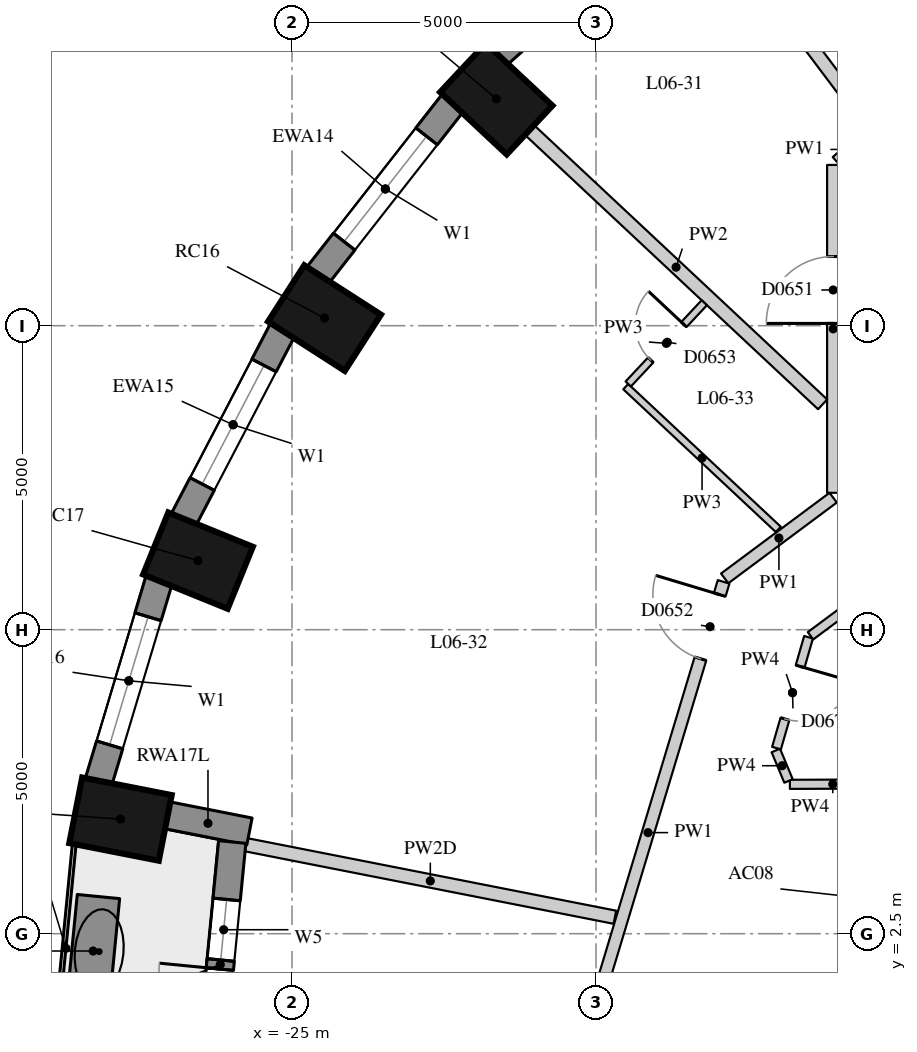
"""IFC4 building model, lengths in metres.
Left out: names, types, materials, properties, quantities, classifications, styles, units other than length and angle.
Written with IfcOpenShell. Run it as: python <this file> out.ifc"""

import sys

from ifc_helpers import new_model, si_unit, direction, frame, frame_2d, origin, origin_2d, place, context, subcontext, project, spatial, rectangle, extrude, element, fill, save


model = new_model("IFC4")
c1 = context("Model", 3, precision=1e-05, world=origin(), true_north=direction((0.0, 1.0)))
c2 = subcontext(c1, "Body", "Model", "MODEL_VIEW")
j1 = project(units=[si_unit("LENGTHUNIT", "METRE"), si_unit("PLANEANGLEUNIT", "RADIAN")], contexts=[c1])
p1 = place(None, origin())
s1 = spatial("IfcSite", under=j1, at=p1, CompositionType="ELEMENT")
p2 = place(p1, origin())
s2 = spatial("IfcBuilding", under=s1, at=p2, CompositionType="ELEMENT")
p3 = place(p2, frame((0.0, 0.0, 28.3)))
s3 = spatial("IfcBuildingStorey", under=s2, at=p3, CompositionType="ELEMENT", Elevation=28.3)
for number, where, z_axis, x_axis in (
    (1, (-21.641, 16.23, 0.0), (0.0, 0.0, 1.0), (-0.73, 0.683, 0.0)),
    (2, (-24.465, 12.625, 0.0), (0.0, 0.0, 1.0), (-0.841, 0.541, 0.0)),
    (3, (-26.546, 8.636, 0.0), (0.0, 0.0, 1.0), (-0.927, 0.376, 0.0)),
    (4, (-27.821, 4.385, 0.0), (0.0, 0.0, 1.0), (-0.981, 0.193, 0.0)),
):
    element("IfcColumn", number, at=place(p3, frame(where, z_axis=z_axis, x_axis=x_axis)), inside=s3, PredefinedType="COLUMN", context=c2, shape_type="SweptSolid", body=[
        extrude(rectangle(XDim=1.5, YDim=1.1, at=origin_2d()), origin(), (0.0, 0.0, 1.0), 3.3),
    ])
p4 = place(p3, frame((-18.871, 19.407, 0.0), z_axis=(0.0, 0.0, 1.0), x_axis=(-0.745526233716, -0.66647628228, 0.0)))
e5 = element("IfcWall", 5, at=p4, inside=s3, PredefinedType="SOLIDWALL", context=c2, shape_type="SweptSolid", body=[
    extrude(rectangle(XDim=3.697, YDim=0.45, at=frame_2d((1.848, 0.0))), origin(), (0.0, 0.0, 1.0), 3.02),
])
p5 = place(p4, frame((0.749, 0.0, 0.4)))
e6 = element("IfcOpeningElement", 6, at=p5, cuts=e5, PredefinedType="OPENING", context=c2, shape_type="SweptSolid", body=[
    extrude(rectangle(XDim=2.2, YDim=1.75, at=frame_2d((1.1, 0.875))), frame((0.0, 0.235, 0.0), z_axis=(0.0, -1.0, 0.0), x_axis=(1.0, 0.0, 0.0)), (0.0, 0.0, 1.0), 0.47),
])
p6 = place(p3, frame((-22.352, 16.17, 0.0), z_axis=(0.0, 0.0, 1.0), x_axis=(-0.616661975264, -0.787228053529, 0.0)))
e7 = element("IfcWall", 7, at=p6, inside=s3, PredefinedType="SOLIDWALL", context=c2, shape_type="SweptSolid", body=[
    extrude(rectangle(XDim=3.61, YDim=0.45, at=frame_2d((1.805, 0.0))), origin(), (0.0, 0.0, 1.0), 3.02),
])
p7 = place(p6, frame((0.705, 0.0, 0.4)))
e8 = element("IfcOpeningElement", 8, at=p7, cuts=e7, PredefinedType="OPENING", context=c2, shape_type="SweptSolid", body=[
    extrude(rectangle(XDim=2.2, YDim=1.75, at=frame_2d((1.1, 0.875))), frame((0.0, 0.235, 0.0), z_axis=(0.0, -1.0, 0.0), x_axis=(1.0, 0.0, 0.0)), (0.0, 0.0, 1.0), 0.47),
])
p8 = place(p3, frame((-25.152, 12.437, 0.0), z_axis=(0.0, 0.0, 1.0), x_axis=(-0.462492775226, -0.886623050041, 0.0)))
e9 = element("IfcWall", 9, at=p8, inside=s3, PredefinedType="SOLIDWALL", context=c2, shape_type="SweptSolid", body=[
    extrude(rectangle(XDim=3.532, YDim=0.45, at=frame_2d((1.766, 0.0))), origin(), (0.0, 0.0, 1.0), 3.02),
])
p9 = place(p8, frame((0.666, 0.0, 0.4)))
e10 = element("IfcOpeningElement", 10, at=p9, cuts=e9, PredefinedType="OPENING", context=c2, shape_type="SweptSolid", body=[
    extrude(rectangle(XDim=2.2, YDim=1.75, at=frame_2d((1.1, 0.875))), frame((0.0, 0.235, 0.0), z_axis=(0.0, -1.0, 0.0), x_axis=(1.0, 0.0, 0.0)), (0.0, 0.0, 1.0), 0.47),
])
p10 = place(p3, frame((-27.185, 8.323, 0.0), z_axis=(0.0, 0.0, 1.0), x_axis=(-0.287064133733, -0.957911364963, 0.0)))
e11 = element("IfcWall", 11, at=p10, inside=s3, PredefinedType="SOLIDWALL", context=c2, shape_type="SweptSolid", body=[
    extrude(rectangle(XDim=3.473, YDim=0.45, at=frame_2d((1.737, 0.0))), origin(), (0.0, 0.0, 1.0), 3.02),
])
p11 = place(p10, frame((0.637, 0.0, 0.4)))
e12 = element("IfcOpeningElement", 12, at=p11, cuts=e11, PredefinedType="OPENING", context=c2, shape_type="SweptSolid", body=[
    extrude(rectangle(XDim=2.2, YDim=1.75, at=frame_2d((1.1, 0.875))), frame((0.0, 0.235, 0.0), z_axis=(0.0, -1.0, 0.0), x_axis=(1.0, 0.0, 0.0)), (0.0, 0.0, 1.0), 0.47),
])
p12 = place(p3, frame((-27.064, 4.45, 0.0), z_axis=(0.0, 0.0, 1.0), x_axis=(0.98123042829, -0.192838913596, 0.0)))
e13 = element("IfcWall", 13, at=p12, inside=s3, PredefinedType="SOLIDWALL", context=c2, shape_type="SweptSolid", body=[
    extrude(rectangle(XDim=1.39, YDim=0.45, at=frame_2d((0.695, 0.0))), origin(), (0.0, 0.0, 1.0), 2.47),
])
p13 = place(p3, frame((-25.983, 4.008, 0.0), z_axis=(0.0, 0.0, 1.0), x_axis=(-0.097133468736, -0.995271364629, 0.0)))
e14 = element("IfcWall", 14, at=p13, inside=s3, PredefinedType="SOLIDWALL", context=c2, shape_type="SweptSolid", body=[
    extrude(rectangle(XDim=4.049, YDim=0.45, at=frame_2d((2.024, 0.0))), origin(), (0.0, 0.0, 1.0), 3.02),
])
p14 = place(p13, frame((0.949, 0.0, 0.4)))
e15 = element("IfcOpeningElement", 15, at=p14, cuts=e14, PredefinedType="OPENING", context=c2, shape_type="SweptSolid", body=[
    extrude(rectangle(XDim=1.0, YDim=1.75, at=frame_2d((0.5, 0.875))), frame((0.0, 0.235, 0.0), z_axis=(0.0, -1.0, 0.0), x_axis=(1.0, 0.0, 0.0)), (0.0, 0.0, 1.0), 0.47),
])
p15 = place(p13, frame((2.1, 0.0, 0.0)))
e16 = element("IfcOpeningElement", 16, at=p15, cuts=e14, PredefinedType="OPENING", context=c2, shape_type="SweptSolid", body=[
    extrude(rectangle(XDim=1.0, YDim=2.15, at=frame_2d((0.5, 1.075))), frame((0.0, 0.235, 0.0), z_axis=(0.0, -1.0, 0.0), x_axis=(1.0, 0.0, 0.0)), (0.0, 0.0, 1.0), 0.47),
])
p16 = place(p3, frame((-28.183, 3.111, 0.0), z_axis=(0.0, 0.0, 1.0), x_axis=(-0.097381768628, -0.995247100543, 0.0)))
e17 = element("IfcWall", 17, at=p16, inside=s3, PredefinedType="USERDEFINED", context=c2, shape_type="SweptSolid", body=[
    extrude(rectangle(XDim=1.8, YDim=0.7, at=frame_2d((0.9, 0.0))), origin(), (0.0, 0.0, 1.0), 0.75),
])
p17 = place(p3, frame((-17.884, 8.344, 0.0), z_axis=(0.0, 0.0, 1.0), x_axis=(0.802260120548, 0.596974621721, 0.0)))
e18 = element("IfcWall", 18, at=p17, inside=s3, PredefinedType="PARTITIONING", context=c2, shape_type="SweptSolid", body=[
    extrude(rectangle(XDim=2.224, YDim=0.2, at=frame_2d((1.112, 0.0))), origin(), (0.0, 0.0, 1.0), 3.02),
])
p18 = place(p3, frame((-16.1, 9.751, 0.0), z_axis=(0.0, 0.0, 1.0), x_axis=(0.0, 1.0, 0.0)))
e19 = element("IfcWall", 19, at=p18, inside=s3, PredefinedType="PARTITIONING", context=c2, shape_type="SweptSolid", body=[
    extrude(rectangle(XDim=5.393, YDim=0.2, at=frame_2d((2.696, 0.0))), origin(), (0.0, 0.0, 1.0), 3.02),
])
p19 = place(p18, frame((2.786, 0.0, 0.0)))
e20 = element("IfcOpeningElement", 20, at=p19, cuts=e19, PredefinedType="OPENING", context=c2, shape_type="SweptSolid", body=[
    extrude(rectangle(XDim=1.1, YDim=2.1, at=frame_2d((0.55, 1.05))), frame((0.0, 0.11, 0.0), z_axis=(0.0, -1.0, 0.0), x_axis=(1.0, 0.0, 0.0)), (0.0, 0.0, 1.0), 0.22),
])
p20 = place(p3, frame((-16.041, 15.198, 0.0), z_axis=(0.0, 0.0, 1.0), x_axis=(0.744722115519, 0.667374685359, 0.0)))
e21 = element("IfcWall", 21, at=p20, inside=s3, PredefinedType="PARTITIONING", context=c2, shape_type="SweptSolid", body=[
    extrude(rectangle(XDim=0.603, YDim=0.2, at=frame_2d((0.301, 0.0))), origin(), (0.0, 0.0, 1.0), 3.02),
])
p21 = place(p3, frame((-20.388, 0.038, 0.0), z_axis=(0.0, 0.0, 1.0), x_axis=(0.288600779805, 0.957449523419, 0.0)))
e22 = element("IfcWall", 22, at=p21, inside=s3, PredefinedType="PARTITIONING", context=c2, shape_type="SweptSolid", body=[
    extrude(rectangle(XDim=8.615, YDim=0.2, at=frame_2d((4.308, 0.0))), origin(), (0.0, 0.0, 1.0), 3.02),
])
p22 = place(p21, frame((7.295, 0.0, 0.0)))
e23 = element("IfcOpeningElement", 23, at=p22, cuts=e22, PredefinedType="OPENING", context=c2, shape_type="SweptSolid", body=[
    extrude(rectangle(XDim=1.1, YDim=2.1, at=frame_2d((0.55, 1.05))), frame((0.0, 0.11, 0.0), z_axis=(0.0, -1.0, 0.0), x_axis=(1.0, 0.0, 0.0)), (0.0, 0.0, 1.0), 0.22),
])
p23 = place(p21, frame((0.22, 0.0, 0.0)))
e24 = element("IfcOpeningElement", 24, at=p23, cuts=e22, PredefinedType="OPENING", context=c2, shape_type="SweptSolid", body=[
    extrude(rectangle(XDim=1.1, YDim=2.1, at=frame_2d((0.55, 1.05))), frame((0.0, 0.11, 0.0), z_axis=(0.0, -1.0, 0.0), x_axis=(1.0, 0.0, 0.0)), (0.0, 0.0, 1.0), 0.22),
])
p24 = place(p3, frame((-15.402, 4.961, 0.0), z_axis=(0.0, 0.0, 1.0), x_axis=(-0.999994001087, -0.003463782477, 0.0)))
e25 = element("IfcWall", 25, at=p24, inside=s3, PredefinedType="PARTITIONING", context=c2, shape_type="SweptSolid", body=[
    extrude(rectangle(XDim=1.41, YDim=0.15, at=frame_2d((0.705, 0.0))), origin(), (0.0, 0.0, 1.0), 3.02),
])
p25 = place(p3, frame((-16.834, 5.012, 0.0), z_axis=(0.0, 0.0, 1.0), x_axis=(-0.384455737739, 0.923143426408, 0.0)))
e26 = element("IfcWall", 26, at=p25, inside=s3, PredefinedType="PARTITIONING", context=c2, shape_type="SweptSolid", body=[
    extrude(rectangle(XDim=0.543, YDim=0.15, at=frame_2d((0.271, 0.0))), origin(), (0.0, 0.0, 1.0), 3.02),
])
p26 = place(p3, frame((-17.032, 5.552, 0.0), z_axis=(0.0, 0.0, 1.0), x_axis=(0.277658349549, 0.96067988473, 0.0)))
e27 = element("IfcWall", 27, at=p26, inside=s3, PredefinedType="PARTITIONING", context=c2, shape_type="SweptSolid", body=[
    extrude(rectangle(XDim=1.898, YDim=0.15, at=frame_2d((0.949, 0.0))), origin(), (0.0, 0.0, 1.0), 3.02),
])
p27 = place(p26, frame((0.499, 0.0, 0.0)))
e28 = element("IfcOpeningElement", 28, at=p27, cuts=e27, PredefinedType="OPENING", context=c2, shape_type="SweptSolid", body=[
    extrude(rectangle(XDim=0.9, YDim=2.1, at=frame_2d((0.45, 1.05))), frame((0.0, 0.085, 0.0), z_axis=(0.0, -1.0, 0.0), x_axis=(1.0, 0.0, 0.0)), (0.0, 0.0, 1.0), 0.17),
])
p28 = place(p3, frame((-16.473, 7.4, 0.0), z_axis=(0.0, 0.0, 1.0), x_axis=(0.802267063429, 0.596965291233, 0.0)))
e29 = element("IfcWall", 29, at=p28, inside=s3, PredefinedType="PARTITIONING", context=c2, shape_type="SweptSolid", body=[
    extrude(rectangle(XDim=2.41, YDim=0.15, at=frame_2d((1.205, 0.0))), origin(), (0.0, 0.0, 1.0), 3.02),
])
p29 = place(p3, frame((-17.708, 18.743, 0.0), z_axis=(0.0, 0.0, 1.0), x_axis=(0.601172757903, -0.799119086967, 0.0)))
e30 = element("IfcWall", 30, at=p29, inside=s3, PredefinedType="PARTITIONING", context=c2, shape_type="SweptSolid", body=[
    extrude(rectangle(XDim=3.729, YDim=0.22, at=frame_2d((1.864, 0.0))), origin(), (0.0, 0.0, 1.0), 2.57),
])
p30 = place(p3, frame((-21.093, 15.718, 0.0), z_axis=(0.0, 0.0, 1.0), x_axis=(0.73009284205, -0.683347965525, 0.0)))
e31 = element("IfcWall", 31, at=p30, inside=s3, PredefinedType="PARTITIONING", context=c2, shape_type="SweptSolid", body=[
    extrude(rectangle(XDim=6.602, YDim=0.22, at=frame_2d((3.301, 0.0))), origin(), (0.0, 0.0, 1.0), 3.02),
])
p31 = place(p3, frame((-25.761, 3.964, 0.0), z_axis=(0.0, 0.0, 1.0), x_axis=(0.981209888948, -0.192943395406, 0.0)))
e32 = element("IfcWall", 32, at=p31, inside=s3, PredefinedType="PARTITIONING", context=c2, shape_type="SweptSolid", body=[
    extrude(rectangle(XDim=6.188, YDim=0.22, at=frame_2d((3.094, 0.0))), origin(), (0.0, 0.0, 1.0), 2.47),
])
p32 = place(p3, frame((-17.002, 9.149, 0.0), z_axis=(0.0, 0.0, 1.0), x_axis=(-0.730093035944, 0.683347758368, 0.0)))
e33 = element("IfcWall", 33, at=p32, inside=s3, PredefinedType="PARTITIONING", context=c2, shape_type="SweptSolid", body=[
    extrude(rectangle(XDim=3.437, YDim=0.12, at=frame_2d((1.718, 0.0))), origin(), (0.0, 0.0, 1.0), 3.02),
])
p33 = place(p3, frame((-19.47, 11.542, 0.0), z_axis=(0.0, 0.0, 1.0), x_axis=(0.683306289544, 0.730131847456, 0.0)))
e34 = element("IfcWall", 34, at=p33, inside=s3, PredefinedType="PARTITIONING", context=c2, shape_type="SweptSolid", body=[
    extrude(rectangle(XDim=1.83, YDim=0.12, at=frame_2d((0.915, 0.0))), origin(), (0.0, 0.0, 1.0), 3.02),
])
p34 = place(p33, frame((0.54, 0.0, 0.0)))
e35 = element("IfcOpeningElement", 35, at=p34, cuts=e34, PredefinedType="OPENING", context=c2, shape_type="SweptSolid", body=[
    extrude(rectangle(XDim=0.8, YDim=2.1, at=frame_2d((0.4, 1.05))), frame((0.0, 0.07, 0.0), z_axis=(0.0, -1.0, 0.0), x_axis=(1.0, 0.0, 0.0)), (0.0, 0.0, 1.0), 0.14),
])
p35 = place(p7, origin())
e36 = element("IfcWindow", 36, at=p35, inside=s3, PartitioningType="SINGLE_PANEL", PredefinedType="WINDOW", context=c2, shape_type="SweptSolid", body=[
    extrude(rectangle(XDim=2.2, YDim=1.75, at=frame_2d((1.1, 0.875))), frame((0.0, 0.035, 0.0), z_axis=(0.0, -1.0, 0.0), x_axis=(1.0, 0.0, 0.0)), (0.0, 0.0, 1.0), 0.06),
])
fill(e8, e36)
p36 = place(p9, origin())
e37 = element("IfcWindow", 37, at=p36, inside=s3, PartitioningType="SINGLE_PANEL", PredefinedType="WINDOW", context=c2, shape_type="SweptSolid", body=[
    extrude(rectangle(XDim=2.2, YDim=1.75, at=frame_2d((1.1, 0.875))), frame((0.0, 0.035, 0.0), z_axis=(0.0, -1.0, 0.0), x_axis=(1.0, 0.0, 0.0)), (0.0, 0.0, 1.0), 0.06),
])
fill(e10, e37)
p37 = place(p11, origin())
e38 = element("IfcWindow", 38, at=p37, inside=s3, PartitioningType="SINGLE_PANEL", PredefinedType="WINDOW", context=c2, shape_type="SweptSolid", body=[
    extrude(rectangle(XDim=2.2, YDim=1.75, at=frame_2d((1.1, 0.875))), frame((0.0, 0.035, 0.0), z_axis=(0.0, -1.0, 0.0), x_axis=(1.0, 0.0, 0.0)), (0.0, 0.0, 1.0), 0.06),
])
fill(e12, e38)
p38 = place(p14, origin())
e39 = element("IfcWindow", 39, at=p38, inside=s3, PartitioningType="SINGLE_PANEL", PredefinedType="WINDOW", context=c2, shape_type="SweptSolid", body=[
    extrude(rectangle(XDim=1.0, YDim=1.75, at=frame_2d((0.5, 0.875))), frame((0.0, 0.035, 0.0), z_axis=(0.0, -1.0, 0.0), x_axis=(1.0, 0.0, 0.0)), (0.0, 0.0, 1.0), 0.06),
])
fill(e15, e39)
p39 = place(p15, frame((1.0, 0.0, 0.0), z_axis=(0.0, 0.0, 1.0), x_axis=(-1.0, 0.0, 0.0)))
e40 = element("IfcDoor", 40, at=p39, inside=s3, OperationType="SINGLE_SWING_RIGHT", PredefinedType="DOOR", context=c2, shape_type="SweptSolid", body=[
    extrude(rectangle(XDim=1.0, YDim=2.15, at=frame_2d((0.5, 1.075))), frame((0.0, 0.075, 0.0), z_axis=(0.0, -1.0, 0.0), x_axis=(1.0, 0.0, 0.0)), (0.0, 0.0, 1.0), 0.05),
])
fill(e16, e40)
p40 = place(p19, origin())
e41 = element("IfcDoor", 41, at=p40, inside=s3, OperationType="SINGLE_SWING_LEFT", PredefinedType="DOOR", context=c2, shape_type="SweptSolid", body=[
    extrude(rectangle(XDim=1.1, YDim=2.1, at=frame_2d((0.55, 1.05))), frame((0.0, 0.025, 0.0), z_axis=(0.0, -1.0, 0.0), x_axis=(1.0, 0.0, 0.0)), (0.0, 0.0, 1.0), 0.05),
])
fill(e20, e41)
p41 = place(p22, origin())
e42 = element("IfcDoor", 42, at=p41, inside=s3, OperationType="SINGLE_SWING_RIGHT", PredefinedType="DOOR", context=c2, shape_type="SweptSolid", body=[
    extrude(rectangle(XDim=1.1, YDim=2.1, at=frame_2d((0.55, 1.05))), frame((0.0, 0.025, 0.0), z_axis=(0.0, -1.0, 0.0), x_axis=(1.0, 0.0, 0.0)), (0.0, 0.0, 1.0), 0.05),
])
fill(e23, e42)
p42 = place(p34, origin())
e43 = element("IfcDoor", 43, at=p42, inside=s3, OperationType="SINGLE_SWING_RIGHT", PredefinedType="DOOR", context=c2, shape_type="SweptSolid", body=[
    extrude(rectangle(XDim=0.8, YDim=2.1, at=frame_2d((0.4, 1.05))), frame((0.0, 0.025, 0.0), z_axis=(0.0, -1.0, 0.0), x_axis=(1.0, 0.0, 0.0)), (0.0, 0.0, 1.0), 0.05),
])
fill(e35, e43)
p43 = place(p27, origin())
e44 = element("IfcDoor", 44, at=p43, inside=s3, OperationType="SINGLE_SWING_LEFT", PredefinedType="DOOR", context=c2, shape_type="SweptSolid", body=[
    extrude(rectangle(XDim=0.9, YDim=2.1, at=frame_2d((0.45, 1.05))), frame((0.0, 0.025, 0.0), z_axis=(0.0, -1.0, 0.0), x_axis=(1.0, 0.0, 0.0)), (0.0, 0.0, 1.0), 0.05),
])
fill(e28, e44)
save(model, sys.argv[1])
